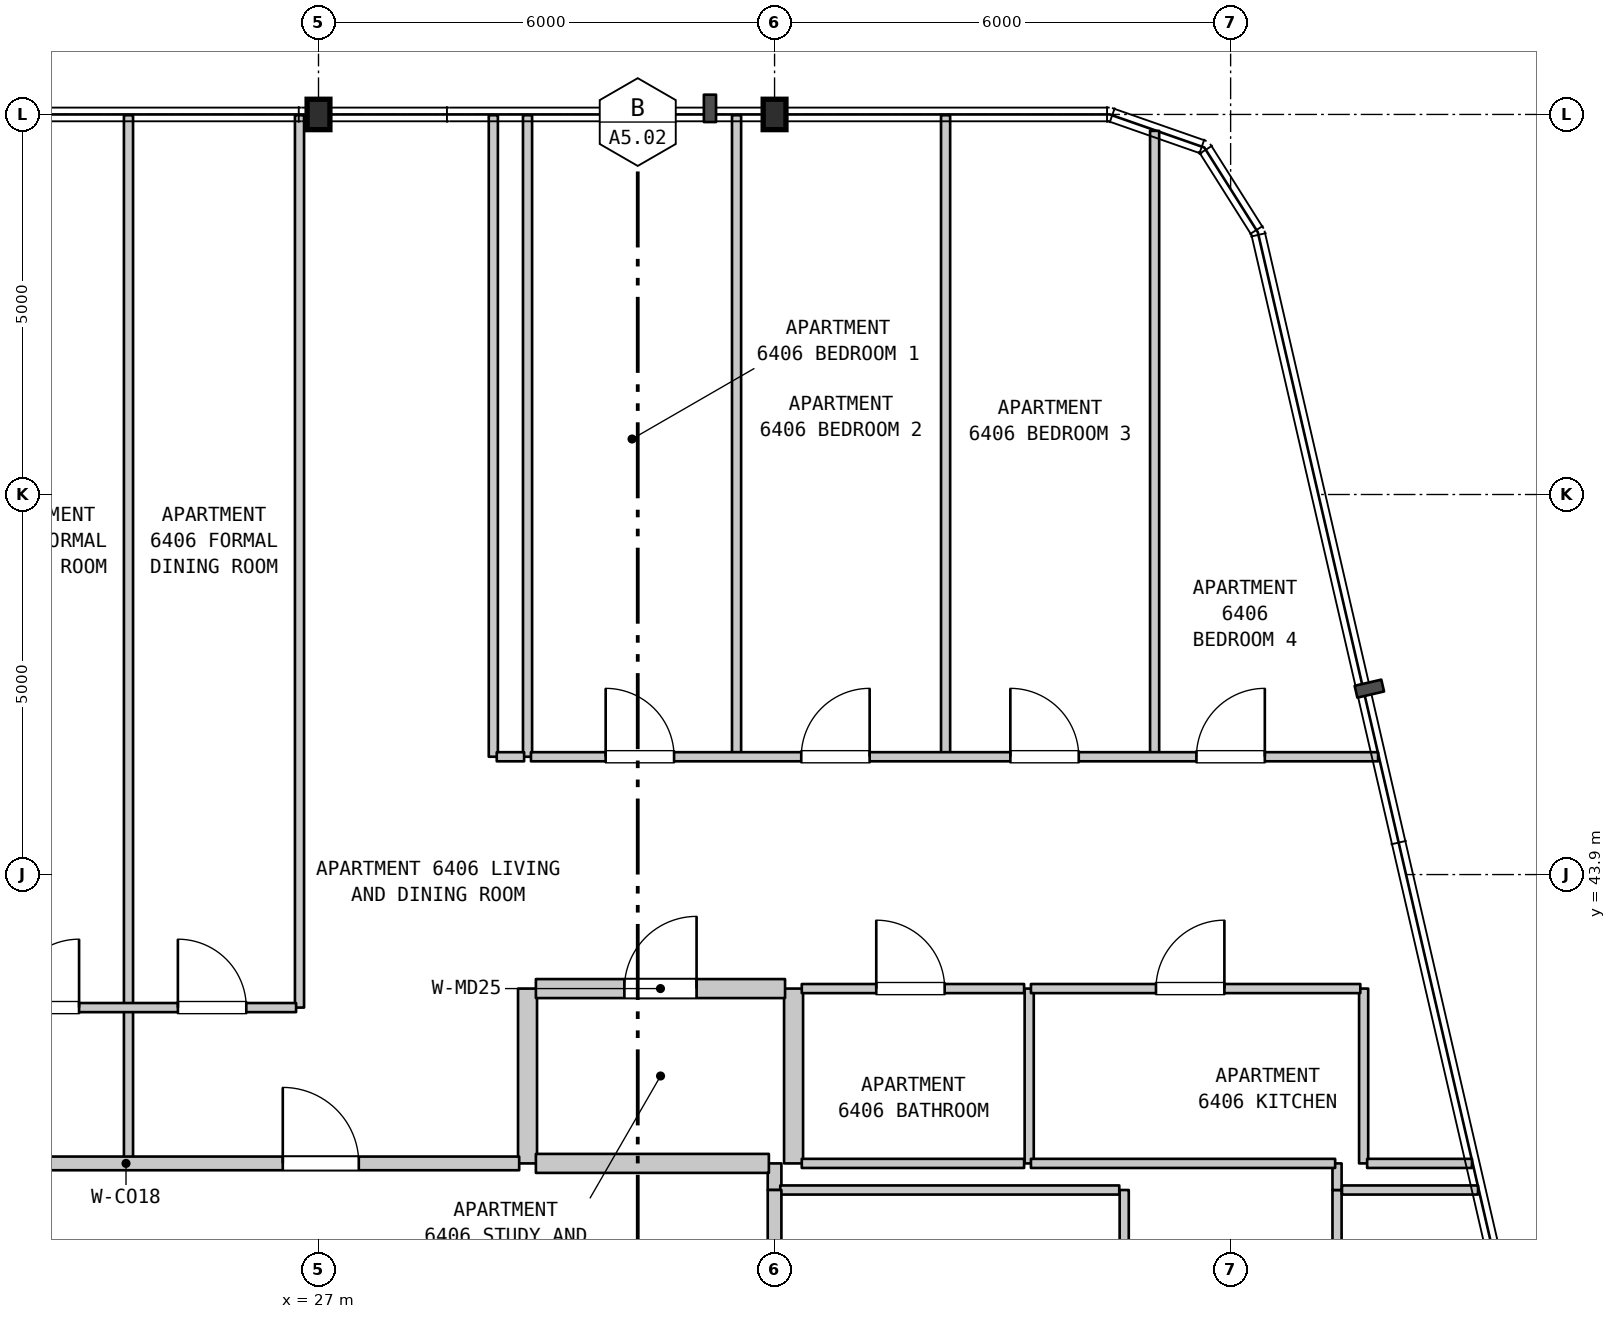
"""IFC4 building model, lengths in metres.
Left out: names, types, materials, properties, quantities, classifications, styles, units other than length and angle.
Written with IfcOpenShell. Run it as: python <this file> out.ifc"""

import sys

from ifc_helpers import new_model, si_unit, direction, frame, frame_2d, origin, origin_2d, place, context, subcontext, project, spatial, rectangle, i_section, extrude, element, fill, save


model = new_model("IFC4")
c1 = context("Model", 3, precision=1e-05, world=origin(), true_north=direction((0.0, 1.0)))
c2 = subcontext(c1, "Body", "Model", "MODEL_VIEW")
j1 = project(units=[si_unit("LENGTHUNIT", "METRE"), si_unit("PLANEANGLEUNIT", "RADIAN")], contexts=[c1])
p1 = place(None, origin())
s1 = spatial("IfcSite", under=j1, at=p1, CompositionType="ELEMENT")
p2 = place(p1, origin())
s2 = spatial("IfcBuilding", under=s1, at=p2, CompositionType="ELEMENT")
p3 = place(p2, frame((0.0, 0.0, 258.4)))
s3 = spatial("IfcBuildingStorey", under=s2, at=p3, CompositionType="ELEMENT", Elevation=258.4)
for number, where, z_axis, x_axis in (
    (1, (27.0, 53.9, 0.0), (0.0, 0.0, 1.0), (1.0, 0.0, 0.0)),
    (2, (33.0, 53.9, 0.0), (0.0, 0.0, 1.0), (1.0, 0.0, 0.0)),
):
    element("IfcColumn", number, at=place(p3, frame(where, z_axis=z_axis, x_axis=x_axis)), inside=s3, PredefinedType="COLUMN", context=c2, shape_type="SweptSolid", body=[
        extrude(i_section(OverallWidth=0.3, OverallDepth=0.4, WebThickness=0.013, FlangeThickness=0.024, FilletRadius=0.027, at=origin_2d()), origin(), (0.0, 0.0, 1.0), 3.7),
    ])
p4 = place(p3, frame((24.5, 40.1, 0.0), z_axis=(0.0, 0.0, 1.0), x_axis=(0.0, 1.0, 0.0)))
e3 = element("IfcWall", 3, at=p4, inside=s3, PredefinedType="PARTITIONING", context=c2, shape_type="SweptSolid", body=[
    extrude(rectangle(XDim=2.05, YDim=0.12, at=frame_2d((1.025, 0.0))), origin(), (0.0, 0.0, 1.0), 3.39),
])
for number, where, z_axis, x_axis in (
    (4, (24.5, 42.15, 0.0), (0.0, 0.0, 1.0), (0.0, 1.0, 0.0)),
    (5, (26.75, 42.15, 0.0), (0.0, 0.0, 1.0), (0.0, 1.0, 0.0)),
):
    element("IfcWall", number, at=place(p3, frame(where, z_axis=z_axis, x_axis=x_axis)), inside=s3, PredefinedType="PARTITIONING", context=c2, shape_type="SweptSolid", body=[
        extrude(rectangle(XDim=11.74, YDim=0.12, at=frame_2d((5.87, 0.0))), origin(), (0.0, 0.0, 1.0), 3.39),
    ])
p5 = place(p3, frame((29.3, 45.45, 0.0), z_axis=(0.0, 0.0, 1.0), x_axis=(0.0, 1.0, 0.0)))
e6 = element("IfcWall", 6, at=p5, inside=s3, PredefinedType="PARTITIONING", context=c2, shape_type="SweptSolid", body=[
    extrude(rectangle(XDim=8.44, YDim=0.12, at=frame_2d((4.22, 0.0))), origin(), (0.0, 0.0, 1.0), 3.39),
])
p6 = place(p3, frame((29.75, 40.1, 0.0), z_axis=(0.0, 0.0, 1.0), x_axis=(0.0, 1.0, 0.0)))
e7 = element("IfcWall", 7, at=p6, inside=s3, PredefinedType="STANDARD", context=c2, shape_type="SweptSolid", body=[
    extrude(rectangle(XDim=2.3, YDim=0.25, at=frame_2d((1.15, 0.0))), origin(), (0.0, 0.0, 1.0), 3.39),
])
for number, where, z_axis, x_axis in (
    (8, (29.75, 45.45, 0.0), (0.0, 0.0, 1.0), (0.0, 1.0, 0.0)),
    (9, (32.5, 45.45, 0.0), (0.0, 0.0, 1.0), (0.0, 1.0, 0.0)),
):
    element("IfcWall", number, at=place(p3, frame(where, z_axis=z_axis, x_axis=x_axis)), inside=s3, PredefinedType="PARTITIONING", context=c2, shape_type="SweptSolid", body=[
        extrude(rectangle(XDim=8.44, YDim=0.12, at=frame_2d((4.22, 0.0))), origin(), (0.0, 0.0, 1.0), 3.39),
    ])
p7 = place(p3, frame((33.0, 39.75, 0.0), z_axis=(0.0, 0.0, 1.0), x_axis=(0.0, 1.0, 0.0)))
e10 = element("IfcWall", 10, at=p7, inside=s3, PredefinedType="STANDARD", context=c2, shape_type="SweptSolid", body=[
    extrude(rectangle(XDim=0.35, YDim=0.18, at=frame_2d((0.175, 0.0))), origin(), (0.0, 0.0, 1.0), 3.39),
])
p8 = place(p3, frame((33.25, 40.1, 0.0), z_axis=(0.0, 0.0, 1.0), x_axis=(0.0, 1.0, 0.0)))
e11 = element("IfcWall", 11, at=p8, inside=s3, PredefinedType="STANDARD", context=c2, shape_type="SweptSolid", body=[
    extrude(rectangle(XDim=2.3, YDim=0.25, at=frame_2d((1.15, 0.0))), origin(), (0.0, 0.0, 1.0), 3.39),
])
p9 = place(p3, frame((35.25, 45.45, 0.0), z_axis=(0.0, 0.0, 1.0), x_axis=(0.0, 1.0, 0.0)))
e12 = element("IfcWall", 12, at=p9, inside=s3, PredefinedType="PARTITIONING", context=c2, shape_type="SweptSolid", body=[
    extrude(rectangle(XDim=8.44, YDim=0.12, at=frame_2d((4.22, 0.0))), origin(), (0.0, 0.0, 1.0), 3.39),
])
p10 = place(p3, frame((36.35, 40.1, 0.0), z_axis=(0.0, 0.0, 1.0), x_axis=(0.0, 1.0, 0.0)))
e13 = element("IfcWall", 13, at=p10, inside=s3, PredefinedType="PARTITIONING", context=c2, shape_type="SweptSolid", body=[
    extrude(rectangle(XDim=2.3, YDim=0.12, at=frame_2d((1.15, 0.0))), origin(), (0.0, 0.0, 1.0), 3.39),
])
p11 = place(p3, frame((37.6, 36.366, 0.0), z_axis=(0.0, 0.0, 1.0), x_axis=(0.0, 1.0, 0.0)))
e14 = element("IfcWall", 14, at=p11, inside=s3, PredefinedType="PARTITIONING", context=c2, shape_type="SweptSolid", body=[
    extrude(rectangle(XDim=3.384, YDim=0.12, at=frame_2d((1.692, 0.0))), origin(), (0.0, 0.0, 1.0), 3.39),
])
p12 = place(p11, frame((1.242, 0.0, 0.0)))
e15 = element("IfcOpeningElement", 15, at=p12, cuts=e14, PredefinedType="OPENING", context=c2, shape_type="SweptSolid", body=[
    extrude(rectangle(XDim=0.9, YDim=2.1, at=frame_2d((0.45, 1.05))), frame((0.0, 0.07, 0.0), z_axis=(0.0, -1.0, 0.0), x_axis=(1.0, 0.0, 0.0)), (0.0, 0.0, 1.0), 0.14),
])
p13 = place(p3, frame((38.0, 45.45, 0.0), z_axis=(0.0, 0.0, 1.0), x_axis=(0.0, 1.0, 0.0)))
e16 = element("IfcWall", 16, at=p13, inside=s3, PredefinedType="PARTITIONING", context=c2, shape_type="SweptSolid", body=[
    extrude(rectangle(XDim=8.234, YDim=0.12, at=frame_2d((4.117, 0.0))), origin(), (0.0, 0.0, 1.0), 3.39),
])
p14 = place(p3, frame((40.4, 32.7, 0.0), z_axis=(0.0, 0.0, 1.0), x_axis=(0.0, 1.0, 0.0)))
e17 = element("IfcWall", 17, at=p14, inside=s3, PredefinedType="PARTITIONING", context=c2, shape_type="SweptSolid", body=[
    extrude(rectangle(XDim=7.05, YDim=0.12, at=frame_2d((3.525, 0.0))), origin(), (0.0, 0.0, 1.0), 3.39),
])
p15 = place(p14, frame((3.004, 0.0, 0.0)))
e18 = element("IfcOpeningElement", 18, at=p15, cuts=e17, PredefinedType="OPENING", context=c2, shape_type="SweptSolid", body=[
    extrude(rectangle(XDim=0.9, YDim=2.15, at=frame_2d((0.45, 1.075))), frame((0.0, 0.07, 0.0), z_axis=(0.0, -1.0, 0.0), x_axis=(1.0, 0.0, 0.0)), (0.0, 0.0, 1.0), 0.14),
])
p16 = place(p3, frame((40.4, 39.75, 0.0), z_axis=(0.0, 0.0, 1.0), x_axis=(0.0, 1.0, 0.0)))
e19 = element("IfcWall", 19, at=p16, inside=s3, PredefinedType="PARTITIONING", context=c2, shape_type="SweptSolid", body=[
    extrude(rectangle(XDim=0.35, YDim=0.12, at=frame_2d((0.175, 0.0))), origin(), (0.0, 0.0, 1.0), 3.39),
])
p17 = place(p3, frame((40.75, 40.1, 0.0), z_axis=(0.0, 0.0, 1.0), x_axis=(0.0, 1.0, 0.0)))
e20 = element("IfcWall", 20, at=p17, inside=s3, PredefinedType="PARTITIONING", context=c2, shape_type="SweptSolid", body=[
    extrude(rectangle(XDim=2.3, YDim=0.12, at=frame_2d((1.15, 0.0))), origin(), (0.0, 0.0, 1.0), 3.39),
])
p18 = place(p3, frame((33.075, 39.75, 0.0), z_axis=(0.0, 0.0, 1.0), x_axis=(1.0, 0.0, 0.0)))
e21 = element("IfcWall", 21, at=p18, inside=s3, PredefinedType="PARTITIONING", context=c2, shape_type="SweptSolid", body=[
    extrude(rectangle(XDim=4.46, YDim=0.12, at=frame_2d((2.23, 0.0))), origin(), (0.0, 0.0, 1.0), 3.39),
])
p19 = place(p3, frame((40.465, 39.75, 0.0), z_axis=(0.0, 0.0, 1.0), x_axis=(1.0, 0.0, 0.0)))
e22 = element("IfcWall", 22, at=p19, inside=s3, PredefinedType="PARTITIONING", context=c2, shape_type="SweptSolid", body=[
    extrude(rectangle(XDim=1.79, YDim=0.12, at=frame_2d((0.895, 0.0))), origin(), (0.0, 0.0, 1.0), 3.39),
])
p20 = place(p3, frame((19.295, 40.1, 0.0), z_axis=(0.0, 0.0, 1.0), x_axis=(1.0, 0.0, 0.0)))
e23 = element("IfcWall", 23, at=p20, inside=s3, PredefinedType="STANDARD", context=c2, shape_type="SweptSolid", body=[
    extrude(rectangle(XDim=10.345, YDim=0.18, at=frame_2d((5.172, 0.0))), origin(), (0.0, 0.0, 1.0), 3.39),
])
p21 = place(p20, frame((2.035, 0.0, 0.0)))
e24 = element("IfcOpeningElement", 24, at=p21, cuts=e23, PredefinedType="OPENING", context=c2, shape_type="SweptSolid", body=[
    extrude(rectangle(XDim=1.0, YDim=2.15, at=frame_2d((0.5, 1.075))), frame((0.0, 0.1, 0.0), z_axis=(0.0, -1.0, 0.0), x_axis=(1.0, 0.0, 0.0)), (0.0, 0.0, 1.0), 0.2),
])
p22 = place(p20, frame((7.235, 0.0, 0.0)))
e25 = element("IfcOpeningElement", 25, at=p22, cuts=e23, PredefinedType="OPENING", context=c2, shape_type="SweptSolid", body=[
    extrude(rectangle(XDim=1.0, YDim=2.15, at=frame_2d((0.5, 1.075))), frame((0.0, 0.1, 0.0), z_axis=(0.0, -1.0, 0.0), x_axis=(1.0, 0.0, 0.0)), (0.0, 0.0, 1.0), 0.2),
])
p23 = place(p3, frame((29.86, 40.1, 0.0), z_axis=(0.0, 0.0, 1.0), x_axis=(1.0, 0.0, 0.0)))
e26 = element("IfcWall", 26, at=p23, inside=s3, PredefinedType="STANDARD", context=c2, shape_type="SweptSolid", body=[
    extrude(rectangle(XDim=3.065, YDim=0.25, at=frame_2d((1.532, 0.0))), origin(), (0.0, 0.0, 1.0), 3.39),
])
p24 = place(p3, frame((33.358, 40.1, 0.0), z_axis=(0.0, 0.0, 1.0), x_axis=(1.0, 0.0, 0.0)))
e27 = element("IfcWall", 27, at=p24, inside=s3, PredefinedType="PARTITIONING", context=c2, shape_type="SweptSolid", body=[
    extrude(rectangle(XDim=2.925, YDim=0.12, at=frame_2d((1.462, 0.0))), origin(), (0.0, 0.0, 1.0), 3.39),
])
p25 = place(p3, frame((36.373, 40.1, 0.0), z_axis=(0.0, 0.0, 1.0), x_axis=(1.0, 0.0, 0.0)))
e28 = element("IfcWall", 28, at=p25, inside=s3, PredefinedType="PARTITIONING", context=c2, shape_type="SweptSolid", body=[
    extrude(rectangle(XDim=4.002, YDim=0.12, at=frame_2d((2.001, 0.0))), origin(), (0.0, 0.0, 1.0), 3.39),
])
p26 = place(p3, frame((40.796, 40.1, 0.0), z_axis=(0.0, 0.0, 1.0), x_axis=(1.0, 0.0, 0.0)))
e29 = element("IfcWall", 29, at=p26, inside=s3, PredefinedType="PARTITIONING", context=c2, shape_type="SweptSolid", body=[
    extrude(rectangle(XDim=1.379, YDim=0.12, at=frame_2d((0.689, 0.0))), origin(), (0.0, 0.0, 1.0), 3.39),
])
p27 = place(p3, frame((22.295, 42.15, 0.0), z_axis=(0.0, 0.0, 1.0), x_axis=(1.0, 0.0, 0.0)))
e30 = element("IfcWall", 30, at=p27, inside=s3, PredefinedType="PARTITIONING", context=c2, shape_type="SweptSolid", body=[
    extrude(rectangle(XDim=4.41, YDim=0.12, at=frame_2d((2.205, 0.0))), origin(), (0.0, 0.0, 1.0), 3.39),
])
p28 = place(p27, frame((0.655, 0.0, 0.0)))
e31 = element("IfcOpeningElement", 31, at=p28, cuts=e30, PredefinedType="OPENING", context=c2, shape_type="SweptSolid", body=[
    extrude(rectangle(XDim=0.9, YDim=2.15, at=frame_2d((0.45, 1.075))), frame((0.0, 0.07, 0.0), z_axis=(0.0, -1.0, 0.0), x_axis=(1.0, 0.0, 0.0)), (0.0, 0.0, 1.0), 0.14),
])
p29 = place(p27, frame((2.855, 0.0, 0.0)))
e32 = element("IfcOpeningElement", 32, at=p29, cuts=e30, PredefinedType="OPENING", context=c2, shape_type="SweptSolid", body=[
    extrude(rectangle(XDim=0.9, YDim=2.15, at=frame_2d((0.45, 1.075))), frame((0.0, 0.07, 0.0), z_axis=(0.0, -1.0, 0.0), x_axis=(1.0, 0.0, 0.0)), (0.0, 0.0, 1.0), 0.14),
])
p30 = place(p3, frame((29.86, 42.4, 0.0), z_axis=(0.0, 0.0, 1.0), x_axis=(1.0, 0.0, 0.0)))
e33 = element("IfcWall", 33, at=p30, inside=s3, PredefinedType="STANDARD", context=c2, shape_type="SweptSolid", body=[
    extrude(rectangle(XDim=3.278, YDim=0.25, at=frame_2d((1.639, 0.0))), origin(), (0.0, 0.0, 1.0), 3.39),
])
p31 = place(p30, frame((1.164, 0.0, 0.0)))
e34 = element("IfcOpeningElement", 34, at=p31, cuts=e33, PredefinedType="OPENING", context=c2, shape_type="SweptSolid", body=[
    extrude(rectangle(XDim=0.95, YDim=2.15, at=frame_2d((0.475, 1.075))), frame((0.0, 0.135, 0.0), z_axis=(0.0, -1.0, 0.0), x_axis=(1.0, 0.0, 0.0)), (0.0, 0.0, 1.0), 0.27),
])
p32 = place(p3, frame((33.358, 42.4, 0.0), z_axis=(0.0, 0.0, 1.0), x_axis=(1.0, 0.0, 0.0)))
e35 = element("IfcWall", 35, at=p32, inside=s3, PredefinedType="PARTITIONING", context=c2, shape_type="SweptSolid", body=[
    extrude(rectangle(XDim=2.925, YDim=0.12, at=frame_2d((1.462, 0.0))), origin(), (0.0, 0.0, 1.0), 3.39),
])
p33 = place(p32, frame((0.98, 0.0, 0.0)))
e36 = element("IfcOpeningElement", 36, at=p33, cuts=e35, PredefinedType="OPENING", context=c2, shape_type="SweptSolid", body=[
    extrude(rectangle(XDim=0.9, YDim=2.1, at=frame_2d((0.45, 1.05))), frame((0.0, 0.07, 0.0), z_axis=(0.0, -1.0, 0.0), x_axis=(1.0, 0.0, 0.0)), (0.0, 0.0, 1.0), 0.14),
])
p34 = place(p3, frame((36.373, 42.4, 0.0), z_axis=(0.0, 0.0, 1.0), x_axis=(1.0, 0.0, 0.0)))
e37 = element("IfcWall", 37, at=p34, inside=s3, PredefinedType="PARTITIONING", context=c2, shape_type="SweptSolid", body=[
    extrude(rectangle(XDim=4.333, YDim=0.12, at=frame_2d((2.167, 0.0))), origin(), (0.0, 0.0, 1.0), 3.39),
])
p35 = place(p34, frame((1.645, 0.0, 0.0)))
e38 = element("IfcOpeningElement", 38, at=p35, cuts=e37, PredefinedType="OPENING", context=c2, shape_type="SweptSolid", body=[
    extrude(rectangle(XDim=0.9, YDim=2.15, at=frame_2d((0.45, 1.075))), frame((0.0, 0.07, 0.0), z_axis=(0.0, -1.0, 0.0), x_axis=(1.0, 0.0, 0.0)), (0.0, 0.0, 1.0), 0.14),
])
p36 = place(p3, frame((29.345, 45.45, 0.0), z_axis=(0.0, 0.0, 1.0), x_axis=(1.0, 0.0, 0.0)))
e39 = element("IfcWall", 39, at=p36, inside=s3, PredefinedType="PARTITIONING", context=c2, shape_type="SweptSolid", body=[
    extrude(rectangle(XDim=0.36, YDim=0.12, at=frame_2d((0.18, 0.0))), origin(), (0.0, 0.0, 1.0), 3.39),
])
p37 = place(p3, frame((29.795, 45.45, 0.0), z_axis=(0.0, 0.0, 1.0), x_axis=(1.0, 0.0, 0.0)))
e40 = element("IfcWall", 40, at=p37, inside=s3, PredefinedType="PARTITIONING", context=c2, shape_type="SweptSolid", body=[
    extrude(rectangle(XDim=11.145, YDim=0.12, at=frame_2d((5.573, 0.0))), origin(), (0.0, 0.0, 1.0), 3.39),
])
p38 = place(p37, frame((0.983, 0.0, 0.0)))
e41 = element("IfcOpeningElement", 41, at=p38, cuts=e40, PredefinedType="OPENING", context=c2, shape_type="SweptSolid", body=[
    extrude(rectangle(XDim=0.9, YDim=2.15, at=frame_2d((0.45, 1.075))), frame((0.0, 0.07, 0.0), z_axis=(0.0, -1.0, 0.0), x_axis=(1.0, 0.0, 0.0)), (0.0, 0.0, 1.0), 0.14),
])
p39 = place(p37, frame((3.556, 0.0, 0.0)))
e42 = element("IfcOpeningElement", 42, at=p39, cuts=e40, PredefinedType="OPENING", context=c2, shape_type="SweptSolid", body=[
    extrude(rectangle(XDim=0.9, YDim=2.15, at=frame_2d((0.45, 1.075))), frame((0.0, 0.07, 0.0), z_axis=(0.0, -1.0, 0.0), x_axis=(1.0, 0.0, 0.0)), (0.0, 0.0, 1.0), 0.14),
])
p40 = place(p37, frame((6.307, 0.0, 0.0)))
e43 = element("IfcOpeningElement", 43, at=p40, cuts=e40, PredefinedType="OPENING", context=c2, shape_type="SweptSolid", body=[
    extrude(rectangle(XDim=0.9, YDim=2.15, at=frame_2d((0.45, 1.075))), frame((0.0, 0.07, 0.0), z_axis=(0.0, -1.0, 0.0), x_axis=(1.0, 0.0, 0.0)), (0.0, 0.0, 1.0), 0.14),
])
p41 = place(p37, frame((8.755, 0.0, 0.0)))
e44 = element("IfcOpeningElement", 44, at=p41, cuts=e40, PredefinedType="OPENING", context=c2, shape_type="SweptSolid", body=[
    extrude(rectangle(XDim=0.9, YDim=2.15, at=frame_2d((0.45, 1.075))), frame((0.0, 0.07, 0.0), z_axis=(0.0, -1.0, 0.0), x_axis=(1.0, 0.0, 0.0)), (0.0, 0.0, 1.0), 0.14),
])
p42 = place(p3, frame((33.0, 37.9, 0.0), z_axis=(0.0, 0.0, 1.0), x_axis=(0.0, 1.0, 0.0)))
e45 = element("IfcWall", 45, at=p42, inside=s3, PredefinedType="STANDARD", context=c2, shape_type="SweptSolid", body=[
    extrude(rectangle(XDim=1.85, YDim=0.18, at=frame_2d((0.925, 0.0))), origin(), (0.0, 0.0, 1.0), 2.79),
])
p43 = place(p22, origin())
e46 = element("IfcDoor", 46, at=p43, inside=s3, OperationType="SINGLE_SWING_LEFT", PredefinedType="DOOR", context=c2, shape_type="SweptSolid", body=[
    extrude(rectangle(XDim=1.0, YDim=2.15, at=frame_2d((0.5, 1.075))), frame((0.0, 0.025, 0.0), z_axis=(0.0, -1.0, 0.0), x_axis=(1.0, 0.0, 0.0)), (0.0, 0.0, 1.0), 0.05),
])
fill(e25, e46)
p44 = place(p28, origin())
e47 = element("IfcDoor", 47, at=p44, inside=s3, OperationType="SINGLE_SWING_RIGHT", PredefinedType="DOOR", context=c2, shape_type="SweptSolid", body=[
    extrude(rectangle(XDim=0.9, YDim=2.15, at=frame_2d((0.45, 1.075))), frame((0.0, 0.025, 0.0), z_axis=(0.0, -1.0, 0.0), x_axis=(1.0, 0.0, 0.0)), (0.0, 0.0, 1.0), 0.05),
])
fill(e31, e47)
p45 = place(p29, origin())
e48 = element("IfcDoor", 48, at=p45, inside=s3, OperationType="SINGLE_SWING_LEFT", PredefinedType="DOOR", context=c2, shape_type="SweptSolid", body=[
    extrude(rectangle(XDim=0.9, YDim=2.15, at=frame_2d((0.45, 1.075))), frame((0.0, 0.025, 0.0), z_axis=(0.0, -1.0, 0.0), x_axis=(1.0, 0.0, 0.0)), (0.0, 0.0, 1.0), 0.05),
])
fill(e32, e48)
p46 = place(p31, origin())
e49 = element("IfcDoor", 49, at=p46, inside=s3, OperationType="SINGLE_SWING_RIGHT", PredefinedType="DOOR", context=c2, shape_type="SweptSolid", body=[
    extrude(rectangle(XDim=0.95, YDim=2.15, at=frame_2d((0.475, 1.075))), frame((0.0, 0.025, 0.0), z_axis=(0.0, -1.0, 0.0), x_axis=(1.0, 0.0, 0.0)), (0.0, 0.0, 1.0), 0.05),
])
fill(e34, e49)
p47 = place(p33, origin())
e50 = element("IfcDoor", 50, at=p47, inside=s3, OperationType="SINGLE_SWING_LEFT", PredefinedType="DOOR", context=c2, shape_type="SweptSolid", body=[
    extrude(rectangle(XDim=0.9, YDim=2.1, at=frame_2d((0.45, 1.05))), frame((0.0, 0.025, 0.0), z_axis=(0.0, -1.0, 0.0), x_axis=(1.0, 0.0, 0.0)), (0.0, 0.0, 1.0), 0.05),
])
fill(e36, e50)
p48 = place(p35, origin())
e51 = element("IfcDoor", 51, at=p48, inside=s3, OperationType="SINGLE_SWING_RIGHT", PredefinedType="DOOR", context=c2, shape_type="SweptSolid", body=[
    extrude(rectangle(XDim=0.9, YDim=2.15, at=frame_2d((0.45, 1.075))), frame((0.0, 0.025, 0.0), z_axis=(0.0, -1.0, 0.0), x_axis=(1.0, 0.0, 0.0)), (0.0, 0.0, 1.0), 0.05),
])
fill(e38, e51)
p49 = place(p38, origin())
e52 = element("IfcDoor", 52, at=p49, inside=s3, OperationType="SINGLE_SWING_LEFT", PredefinedType="DOOR", context=c2, shape_type="SweptSolid", body=[
    extrude(rectangle(XDim=0.9, YDim=2.15, at=frame_2d((0.45, 1.075))), frame((0.0, 0.025, 0.0), z_axis=(0.0, -1.0, 0.0), x_axis=(1.0, 0.0, 0.0)), (0.0, 0.0, 1.0), 0.05),
])
fill(e41, e52)
p50 = place(p39, origin())
e53 = element("IfcDoor", 53, at=p50, inside=s3, OperationType="SINGLE_SWING_RIGHT", PredefinedType="DOOR", context=c2, shape_type="SweptSolid", body=[
    extrude(rectangle(XDim=0.9, YDim=2.15, at=frame_2d((0.45, 1.075))), frame((0.0, 0.025, 0.0), z_axis=(0.0, -1.0, 0.0), x_axis=(1.0, 0.0, 0.0)), (0.0, 0.0, 1.0), 0.05),
])
fill(e42, e53)
p51 = place(p40, origin())
e54 = element("IfcDoor", 54, at=p51, inside=s3, OperationType="SINGLE_SWING_LEFT", PredefinedType="DOOR", context=c2, shape_type="SweptSolid", body=[
    extrude(rectangle(XDim=0.9, YDim=2.15, at=frame_2d((0.45, 1.075))), frame((0.0, 0.025, 0.0), z_axis=(0.0, -1.0, 0.0), x_axis=(1.0, 0.0, 0.0)), (0.0, 0.0, 1.0), 0.05),
])
fill(e43, e54)
p52 = place(p41, origin())
e55 = element("IfcDoor", 55, at=p52, inside=s3, OperationType="SINGLE_SWING_RIGHT", PredefinedType="DOOR", context=c2, shape_type="SweptSolid", body=[
    extrude(rectangle(XDim=0.9, YDim=2.15, at=frame_2d((0.45, 1.075))), frame((0.0, 0.025, 0.0), z_axis=(0.0, -1.0, 0.0), x_axis=(1.0, 0.0, 0.0)), (0.0, 0.0, 1.0), 0.05),
])
fill(e44, e55)
save(model, sys.argv[1])
